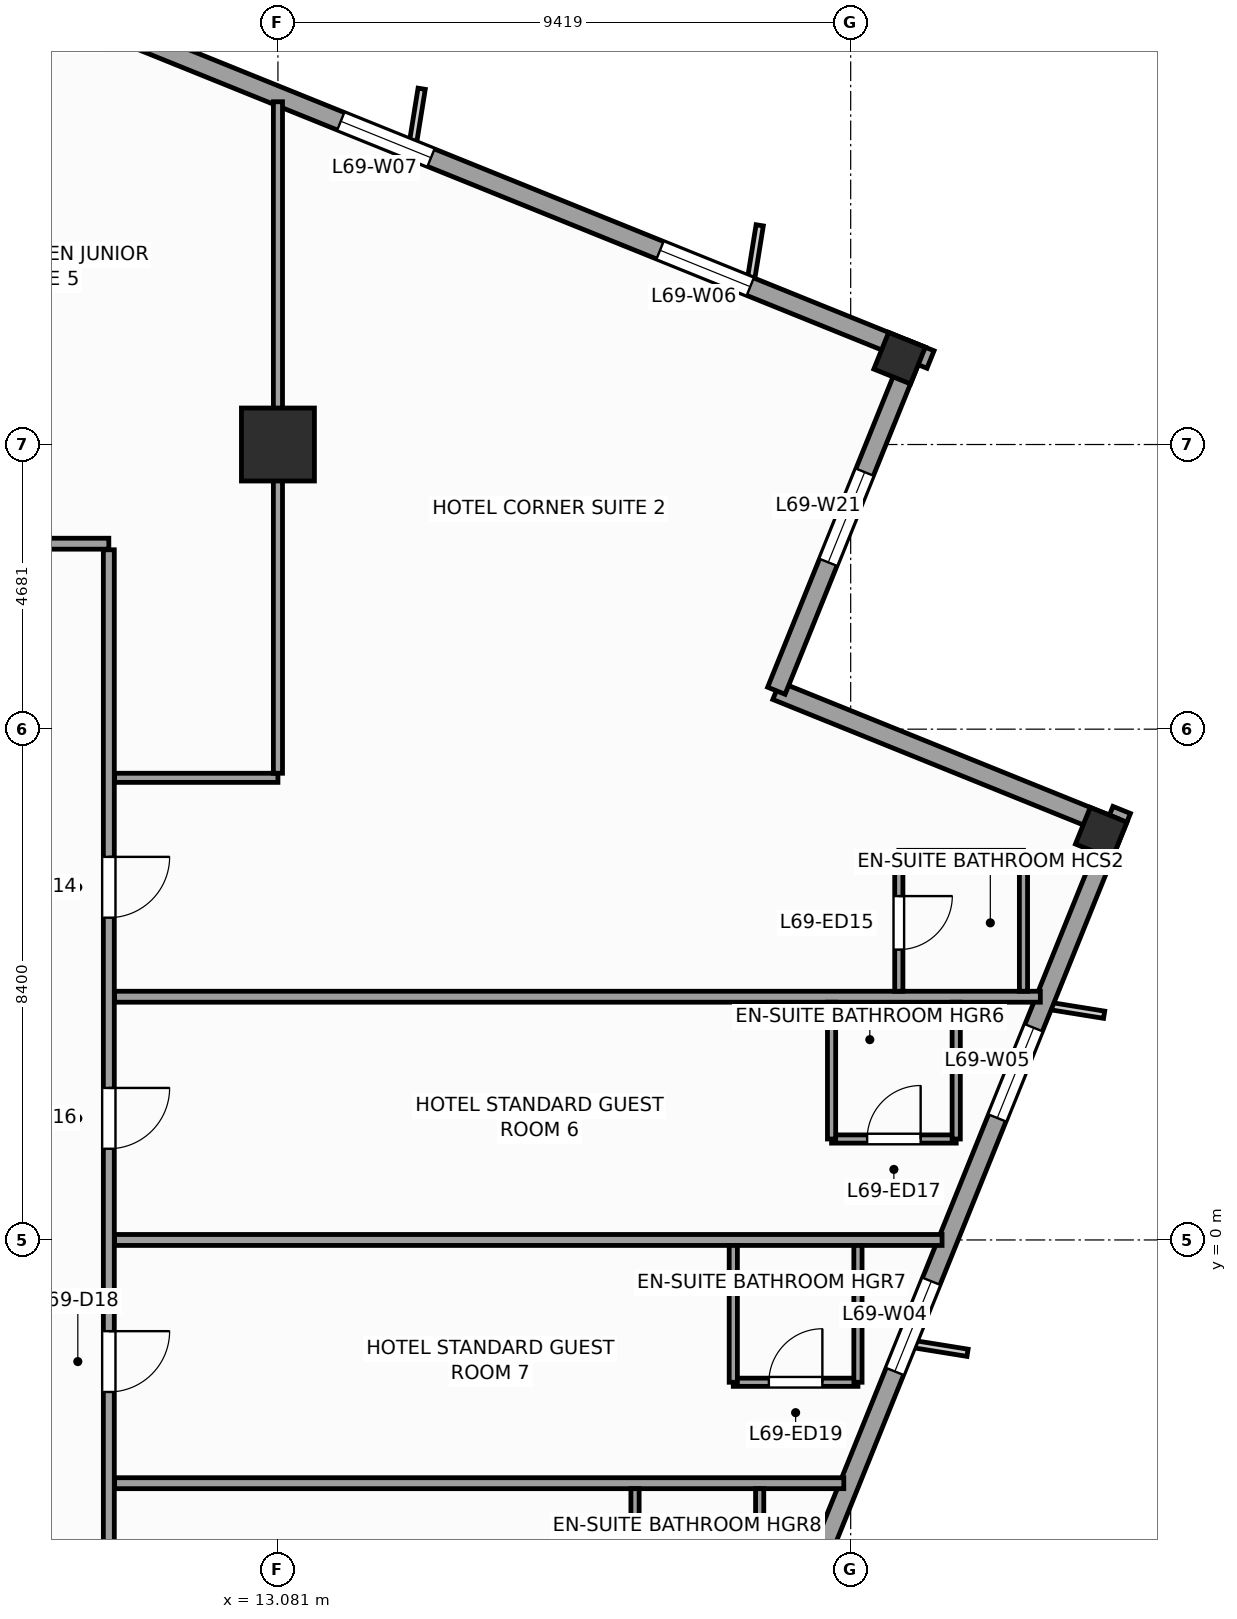
"""IFC4 building model, lengths in metres.
Left out: names, types, materials, properties, quantities, classifications, styles, units other than length and angle.
Written with IfcOpenShell. Run it as: python <this file> out.ifc"""

import sys

from ifc_helpers import new_model, si_unit, direction, frame, frame_2d, origin, origin_2d, place, context, subcontext, project, spatial, rectangle, extrude, source, transform, mapped, element, fill, save


model = new_model("IFC4")
c1 = context("Model", 3, precision=1e-05, world=origin(), true_north=direction((0.0, 1.0)))
c2 = subcontext(c1, "Body", "Model", "MODEL_VIEW")
j1 = project(units=[si_unit("LENGTHUNIT", "METRE"), si_unit("PLANEANGLEUNIT", "RADIAN")], contexts=[c1])
p1 = place(None, origin())
s1 = spatial("IfcSite", under=j1, at=p1, CompositionType="ELEMENT")
p2 = place(p1, origin())
s2 = spatial("IfcBuilding", under=s1, at=p2, CompositionType="ELEMENT")
p3 = place(p2, frame((0.0, 0.0, 283.2)))
s3 = spatial("IfcBuildingStorey", under=s2, at=p3, CompositionType="ELEMENT", Elevation=283.2)
m1 = source(origin(), c2, "Body", "SweptSolid", [
    extrude(rectangle(XDim=1.2, YDim=1.2, at=origin_2d()), origin(), (0.0, 0.0, 1.0), 3.6),
])
p4 = place(p3, frame((13.081, 13.081, 0.0), z_axis=(0.0, 0.0, 1.0), x_axis=(1.0, 0.0, 0.0)))
e1 = element("IfcColumn", 1, at=p4, inside=s3, PredefinedType="COLUMN", context=c2, shape_type="MappedRepresentation", body=[
    mapped(m1, transform((0.0, 0.0, 0.0), scale=1.0)),
])
m2 = source(origin(), c2, "Body", "SweptSolid", [
    extrude(rectangle(XDim=0.65, YDim=0.65, at=origin_2d()), origin(), (0.0, 0.0, 1.0), 3.6),
])
for number, where, z_axis, x_axis in (
    (2, (26.62, 6.69, 0.0), (0.0, 0.0, 1.0), (0.375, 0.927, 0.0)),
    (3, (23.304, 14.501, 0.0), (0.0, 0.0, 1.0), (0.375, 0.927, 0.0)),
):
    element("IfcColumn", number, at=place(p3, frame(where, z_axis=z_axis, x_axis=x_axis)), inside=s3, PredefinedType="COLUMN", context=c2, shape_type="MappedRepresentation", body=[
        mapped(m2, transform((0.0, 0.0, 0.0), scale=1.0)),
    ])
p5 = place(p3, frame((14.479, -23.813, 0.0), z_axis=(0.0, 0.0, 1.0), x_axis=(0.374609557019, 0.927182657188, 0.0)))
e4 = element("IfcWall", 4, at=p5, inside=s3, PredefinedType="STANDARD", context=c2, shape_type="SweptSolid", body=[
    extrude(rectangle(XDim=33.31, YDim=0.31, at=frame_2d((16.655, 0.0))), origin(), (0.0, 0.0, 1.0), 2.75),
])
p6 = place(p5, frame((10.53, 0.0, 0.0)))
e5 = element("IfcOpeningElement", 5, at=p6, cuts=e4, PredefinedType="OPENING", context=c2, shape_type="SweptSolid", body=[
    extrude(rectangle(XDim=1.05, YDim=2.25, at=frame_2d((0.525, 1.125))), frame((0.0, 0.165, 0.0), z_axis=(0.0, -1.0, 0.0), x_axis=(1.0, 0.0, 0.0)), (0.0, 0.0, 1.0), 0.33),
])
p7 = place(p5, frame((3.197, 0.0, 0.47)))
e6 = element("IfcOpeningElement", 6, at=p7, cuts=e4, PredefinedType="OPENING", context=c2, shape_type="SweptSolid", body=[
    extrude(rectangle(XDim=1.6, YDim=2.1, at=frame_2d((0.8, 1.05))), frame((0.0, 0.165, 0.0), z_axis=(0.0, -1.0, 0.0), x_axis=(1.0, 0.0, 0.0)), (0.0, 0.0, 1.0), 0.33),
])
p8 = place(p5, frame((7.36, 0.0, 0.47)))
e7 = element("IfcOpeningElement", 7, at=p8, cuts=e4, PredefinedType="OPENING", context=c2, shape_type="SweptSolid", body=[
    extrude(rectangle(XDim=1.6, YDim=2.1, at=frame_2d((0.8, 1.05))), frame((0.0, 0.165, 0.0), z_axis=(0.0, -1.0, 0.0), x_axis=(1.0, 0.0, 0.0)), (0.0, 0.0, 1.0), 0.33),
])
p9 = place(p5, frame((14.439, 0.0, 0.47)))
e8 = element("IfcOpeningElement", 8, at=p9, cuts=e4, PredefinedType="OPENING", context=c2, shape_type="SweptSolid", body=[
    extrude(rectangle(XDim=1.6, YDim=2.1, at=frame_2d((0.8, 1.05))), frame((0.0, 0.165, 0.0), z_axis=(0.0, -1.0, 0.0), x_axis=(1.0, 0.0, 0.0)), (0.0, 0.0, 1.0), 0.33),
])
p10 = place(p5, frame((23.351, 0.0, 0.47)))
e9 = element("IfcOpeningElement", 9, at=p10, cuts=e4, PredefinedType="OPENING", context=c2, shape_type="SweptSolid", body=[
    extrude(rectangle(XDim=1.6, YDim=2.1, at=frame_2d((0.8, 1.05))), frame((0.0, 0.165, 0.0), z_axis=(0.0, -1.0, 0.0), x_axis=(1.0, 0.0, 0.0)), (0.0, 0.0, 1.0), 0.33),
])
p11 = place(p5, frame((27.847, 0.0, 0.47)))
e10 = element("IfcOpeningElement", 10, at=p11, cuts=e4, PredefinedType="OPENING", context=c2, shape_type="SweptSolid", body=[
    extrude(rectangle(XDim=1.6, YDim=2.1, at=frame_2d((0.8, 1.05))), frame((0.0, 0.165, 0.0), z_axis=(0.0, -1.0, 0.0), x_axis=(1.0, 0.0, 0.0)), (0.0, 0.0, 1.0), 0.33),
])
p12 = place(p3, frame((26.841, 6.784, 0.0), z_axis=(0.0, 0.0, 1.0), x_axis=(-0.927171722085, 0.374636620962, 0.0)))
e11 = element("IfcWall", 11, at=p12, inside=s3, PredefinedType="STANDARD", context=c2, shape_type="SweptSolid", body=[
    extrude(rectangle(XDim=6.0, YDim=0.31, at=frame_2d((3.0, 0.0))), origin(), (0.0, 0.0, 1.0), 2.65),
])
p13 = place(p3, frame((21.278, 9.032, 0.0), z_axis=(0.0, 0.0, 1.0), x_axis=(0.374602739196, 0.927185411764, 0.0)))
e12 = element("IfcWall", 12, at=p13, inside=s3, PredefinedType="STANDARD", context=c2, shape_type="SweptSolid", body=[
    extrude(rectangle(XDim=6.155, YDim=0.31, at=frame_2d((3.078, 0.0))), origin(), (0.0, 0.0, 1.0), 3.35),
])
p14 = place(p13, frame((2.278, 0.0, 0.47)))
e13 = element("IfcOpeningElement", 13, at=p14, cuts=e12, PredefinedType="OPENING", context=c2, shape_type="SweptSolid", body=[
    extrude(rectangle(XDim=1.6, YDim=2.1, at=frame_2d((0.8, 1.05))), frame((0.0, 0.165, 0.0), z_axis=(0.0, -1.0, 0.0), x_axis=(1.0, 0.0, 0.0)), (0.0, 0.0, 1.0), 0.33),
])
p15 = place(p3, frame((23.813, 14.479, 0.0), z_axis=(0.0, 0.0, 1.0), x_axis=(-0.927182657188, 0.374609557019, 0.0)))
e14 = element("IfcWall", 14, at=p15, inside=s3, PredefinedType="STANDARD", context=c2, shape_type="SweptSolid", body=[
    extrude(rectangle(XDim=33.31, YDim=0.31, at=frame_2d((16.655, 0.0))), origin(), (0.0, 0.0, 1.0), 2.75),
])
p16 = place(p15, frame((3.197, 0.0, 0.47)))
e15 = element("IfcOpeningElement", 15, at=p16, cuts=e14, PredefinedType="OPENING", context=c2, shape_type="SweptSolid", body=[
    extrude(rectangle(XDim=1.6, YDim=2.1, at=frame_2d((0.8, 1.05))), frame((0.0, 0.165, 0.0), z_axis=(0.0, -1.0, 0.0), x_axis=(1.0, 0.0, 0.0)), (0.0, 0.0, 1.0), 0.33),
])
p17 = place(p15, frame((8.86, 0.0, 0.47)))
e16 = element("IfcOpeningElement", 16, at=p17, cuts=e14, PredefinedType="OPENING", context=c2, shape_type="SweptSolid", body=[
    extrude(rectangle(XDim=1.6, YDim=2.1, at=frame_2d((0.8, 1.05))), frame((0.0, 0.165, 0.0), z_axis=(0.0, -1.0, 0.0), x_axis=(1.0, 0.0, 0.0)), (0.0, 0.0, 1.0), 0.33),
])
p18 = place(p15, frame((14.439, 0.0, 0.47)))
e17 = element("IfcOpeningElement", 17, at=p18, cuts=e14, PredefinedType="OPENING", context=c2, shape_type="SweptSolid", body=[
    extrude(rectangle(XDim=1.6, YDim=2.1, at=frame_2d((0.8, 1.05))), frame((0.0, 0.165, 0.0), z_axis=(0.0, -1.0, 0.0), x_axis=(1.0, 0.0, 0.0)), (0.0, 0.0, 1.0), 0.33),
])
p19 = place(p15, frame((21.851, 0.0, 0.47)))
e18 = element("IfcOpeningElement", 18, at=p19, cuts=e14, PredefinedType="OPENING", context=c2, shape_type="SweptSolid", body=[
    extrude(rectangle(XDim=1.6, YDim=2.1, at=frame_2d((0.8, 1.05))), frame((0.0, 0.165, 0.0), z_axis=(0.0, -1.0, 0.0), x_axis=(1.0, 0.0, 0.0)), (0.0, 0.0, 1.0), 0.33),
])
p20 = place(p15, frame((27.097, 0.0, 0.47)))
e19 = element("IfcOpeningElement", 19, at=p20, cuts=e14, PredefinedType="OPENING", context=c2, shape_type="SweptSolid", body=[
    extrude(rectangle(XDim=1.6, YDim=2.1, at=frame_2d((0.8, 1.05))), frame((0.0, 0.165, 0.0), z_axis=(0.0, -1.0, 0.0), x_axis=(1.0, 0.0, 0.0)), (0.0, 0.0, 1.0), 0.33),
])
p21 = place(p3, frame((-11.45, 11.45, 0.0), z_axis=(0.0, 0.0, 1.0), x_axis=(1.0, 0.0, 0.0)))
e20 = element("IfcWall", 20, at=p21, inside=s3, PredefinedType="PARTITIONING", context=c2, shape_type="SweptSolid", body=[
    extrude(rectangle(XDim=21.75, YDim=0.18, at=frame_2d((10.875, 0.0))), origin(), (0.0, 0.0, 1.0), 3.35),
])
p22 = place(p21, frame((2.639, 0.0, 0.0)))
e21 = element("IfcOpeningElement", 21, at=p22, cuts=e20, PredefinedType="OPENING", context=c2, shape_type="SweptSolid", body=[
    extrude(rectangle(XDim=1.0, YDim=2.15, at=frame_2d((0.5, 1.075))), frame((0.0, 0.1, 0.0), z_axis=(0.0, -1.0, 0.0), x_axis=(1.0, 0.0, 0.0)), (0.0, 0.0, 1.0), 0.2),
])
p23 = place(p21, frame((7.8, 0.0, 0.0)))
e22 = element("IfcOpeningElement", 22, at=p23, cuts=e20, PredefinedType="OPENING", context=c2, shape_type="SweptSolid", body=[
    extrude(rectangle(XDim=1.0, YDim=2.15, at=frame_2d((0.5, 1.075))), frame((0.0, 0.1, 0.0), z_axis=(0.0, -1.0, 0.0), x_axis=(1.0, 0.0, 0.0)), (0.0, 0.0, 1.0), 0.2),
])
p24 = place(p21, frame((12.65, 0.0, 0.0)))
e23 = element("IfcOpeningElement", 23, at=p24, cuts=e20, PredefinedType="OPENING", context=c2, shape_type="SweptSolid", body=[
    extrude(rectangle(XDim=1.0, YDim=2.15, at=frame_2d((0.5, 1.075))), frame((0.0, 0.1, 0.0), z_axis=(0.0, -1.0, 0.0), x_axis=(1.0, 0.0, 0.0)), (0.0, 0.0, 1.0), 0.2),
])
p25 = place(p21, frame((18.036, 0.0, 0.0)))
e24 = element("IfcOpeningElement", 24, at=p25, cuts=e20, PredefinedType="OPENING", context=c2, shape_type="SweptSolid", body=[
    extrude(rectangle(XDim=1.0, YDim=2.15, at=frame_2d((0.5, 1.075))), frame((0.0, 0.1, 0.0), z_axis=(0.0, -1.0, 0.0), x_axis=(1.0, 0.0, 0.0)), (0.0, 0.0, 1.0), 0.2),
])
p26 = place(p3, frame((10.3, -12.35, 0.0), z_axis=(0.0, 0.0, 1.0), x_axis=(0.0, 1.0, 0.0)))
e25 = element("IfcWall", 25, at=p26, inside=s3, PredefinedType="PARTITIONING", context=c2, shape_type="SweptSolid", body=[
    extrude(rectangle(XDim=23.7, YDim=0.18, at=frame_2d((11.85, 0.0))), origin(), (0.0, 0.0, 1.0), 3.35),
])
p27 = place(p26, frame((17.65, 0.0, 0.0)))
e26 = element("IfcOpeningElement", 26, at=p27, cuts=e25, PredefinedType="OPENING", context=c2, shape_type="SweptSolid", body=[
    extrude(rectangle(XDim=1.0, YDim=2.15, at=frame_2d((0.5, 1.075))), frame((0.0, 0.1, 0.0), z_axis=(0.0, -1.0, 0.0), x_axis=(1.0, 0.0, 0.0)), (0.0, 0.0, 1.0), 0.2),
])
p28 = place(p26, frame((13.85, 0.0, 0.0)))
e27 = element("IfcOpeningElement", 27, at=p28, cuts=e25, PredefinedType="OPENING", context=c2, shape_type="SweptSolid", body=[
    extrude(rectangle(XDim=1.0, YDim=2.15, at=frame_2d((0.5, 1.075))), frame((0.0, 0.1, 0.0), z_axis=(0.0, -1.0, 0.0), x_axis=(1.0, 0.0, 0.0)), (0.0, 0.0, 1.0), 0.2),
])
p29 = place(p26, frame((9.85, 0.0, 0.0)))
e28 = element("IfcOpeningElement", 28, at=p29, cuts=e25, PredefinedType="OPENING", context=c2, shape_type="SweptSolid", body=[
    extrude(rectangle(XDim=1.0, YDim=2.15, at=frame_2d((0.5, 1.075))), frame((0.0, 0.1, 0.0), z_axis=(0.0, -1.0, 0.0), x_axis=(1.0, 0.0, 0.0)), (0.0, 0.0, 1.0), 0.2),
])
p30 = place(p26, frame((6.05, 0.0, 0.0)))
e29 = element("IfcOpeningElement", 29, at=p30, cuts=e25, PredefinedType="OPENING", context=c2, shape_type="SweptSolid", body=[
    extrude(rectangle(XDim=1.0, YDim=2.15, at=frame_2d((0.5, 1.075))), frame((0.0, 0.1, 0.0), z_axis=(0.0, -1.0, 0.0), x_axis=(1.0, 0.0, 0.0)), (0.0, 0.0, 1.0), 0.2),
])
p31 = place(p3, frame((10.395, 4.0, 0.0), z_axis=(0.0, 0.0, 1.0), x_axis=(1.0, 0.0, 0.0)))
e30 = element("IfcWall", 30, at=p31, inside=s3, PredefinedType="PARTITIONING", context=c2, shape_type="SweptSolid", body=[
    extrude(rectangle(XDim=15.224, YDim=0.18, at=frame_2d((7.612, 0.0))), origin(), (0.0, 0.0, 1.0), 3.35),
])
p32 = place(p3, frame((10.395, 0.0, 0.0), z_axis=(0.0, 0.0, 1.0), x_axis=(1.0, 0.0, 0.0)))
e31 = element("IfcWall", 31, at=p32, inside=s3, PredefinedType="PARTITIONING", context=c2, shape_type="SweptSolid", body=[
    extrude(rectangle(XDim=13.608, YDim=0.18, at=frame_2d((6.804, 0.0))), origin(), (0.0, 0.0, 1.0), 3.35),
])
p33 = place(p3, frame((10.395, -4.0, 0.0), z_axis=(0.0, 0.0, 1.0), x_axis=(1.0, 0.0, 0.0)))
e32 = element("IfcWall", 32, at=p33, inside=s3, PredefinedType="PARTITIONING", context=c2, shape_type="SweptSolid", body=[
    extrude(rectangle(XDim=11.992, YDim=0.18, at=frame_2d((5.996, 0.0))), origin(), (0.0, 0.0, 1.0), 3.35),
])
p34 = place(p3, frame((10.395, 7.6, 0.0), z_axis=(0.0, 0.0, 1.0), x_axis=(1.0, 0.0, 0.0)))
e33 = element("IfcWall", 33, at=p34, inside=s3, PredefinedType="PARTITIONING", context=c2, shape_type="SweptSolid", body=[
    extrude(rectangle(XDim=2.686, YDim=0.15, at=frame_2d((1.343, 0.0))), origin(), (0.0, 0.0, 1.0), 3.35),
])
p35 = place(p3, frame((13.081, 7.675, 0.0), z_axis=(0.0, 0.0, 1.0), x_axis=(0.0, 1.0, 0.0)))
e34 = element("IfcWall", 34, at=p35, inside=s3, PredefinedType="PARTITIONING", context=c2, shape_type="SweptSolid", body=[
    extrude(rectangle(XDim=11.043, YDim=0.15, at=frame_2d((5.521, 0.0))), origin(), (0.0, 0.0, 1.0), 2.45),
])
p36 = place(p3, frame((25.342, 4.09, 0.0), z_axis=(0.0, 0.0, 1.0), x_axis=(0.0, 1.0, 0.0)))
e35 = element("IfcWall", 35, at=p36, inside=s3, PredefinedType="PARTITIONING", context=c2, shape_type="SweptSolid", body=[
    extrude(rectangle(XDim=2.25, YDim=0.135, at=frame_2d((1.125, 0.0))), origin(), (0.0, 0.0, 1.0), 2.75),
])
p37 = place(p3, frame((23.292, 6.34, 0.0), z_axis=(0.0, 0.0, 1.0), x_axis=(1.0, 0.0, 0.0)))
e36 = element("IfcWall", 36, at=p37, inside=s3, PredefinedType="PARTITIONING", context=c2, shape_type="SweptSolid", body=[
    extrude(rectangle(XDim=2.05, YDim=0.135, at=frame_2d((1.025, 0.0))), origin(), (0.0, 0.0, 1.0), 3.35),
])
p38 = place(p3, frame((23.292, 4.09, 0.0), z_axis=(0.0, 0.0, 1.0), x_axis=(0.0, 1.0, 0.0)))
e37 = element("IfcWall", 37, at=p38, inside=s3, PredefinedType="PARTITIONING", context=c2, shape_type="SweptSolid", body=[
    extrude(rectangle(XDim=2.25, YDim=0.135, at=frame_2d((1.125, 0.0))), origin(), (0.0, 0.0, 1.0), 2.95),
])
p39 = place(p38, frame((0.685, 0.0, 0.0)))
e38 = element("IfcOpeningElement", 38, at=p39, cuts=e37, PredefinedType="OPENING", context=c2, shape_type="SweptSolid", body=[
    extrude(rectangle(XDim=0.88, YDim=2.1, at=frame_2d((0.44, 1.05))), frame((0.0, 0.078, 0.0), z_axis=(0.0, -1.0, 0.0), x_axis=(1.0, 0.0, 0.0)), (0.0, 0.0, 1.0), 0.155),
])
p40 = place(p3, frame((22.186, 1.66, 0.0), z_axis=(0.0, 0.0, 1.0), x_axis=(1.0, 0.0, 0.0)))
e39 = element("IfcWall", 39, at=p40, inside=s3, PredefinedType="PARTITIONING", context=c2, shape_type="SweptSolid", body=[
    extrude(rectangle(XDim=2.05, YDim=0.135, at=frame_2d((1.025, 0.0))), origin(), (0.0, 0.0, 1.0), 3.35),
])
p41 = place(p40, frame((0.585, 0.0, 0.0)))
e40 = element("IfcOpeningElement", 40, at=p41, cuts=e39, PredefinedType="OPENING", context=c2, shape_type="SweptSolid", body=[
    extrude(rectangle(XDim=0.88, YDim=2.1, at=frame_2d((0.44, 1.05))), frame((0.0, 0.078, 0.0), z_axis=(0.0, -1.0, 0.0), x_axis=(1.0, 0.0, 0.0)), (0.0, 0.0, 1.0), 0.155),
])
for number, where, z_axis, x_axis in (
    (41, (24.236, 1.66, 0.0), (0.0, 0.0, 1.0), (0.0, 1.0, 0.0)),
    (42, (22.186, 1.66, 0.0), (0.0, 0.0, 1.0), (0.0, 1.0, 0.0)),
):
    element("IfcWall", number, at=place(p3, frame(where, z_axis=z_axis, x_axis=x_axis)), inside=s3, PredefinedType="PARTITIONING", context=c2, shape_type="SweptSolid", body=[
        extrude(rectangle(XDim=2.25, YDim=0.135, at=frame_2d((1.125, 0.0))), origin(), (0.0, 0.0, 1.0), 3.35),
    ])
p42 = place(p3, frame((20.57, -2.34, 0.0), z_axis=(0.0, 0.0, 1.0), x_axis=(1.0, 0.0, 0.0)))
e43 = element("IfcWall", 43, at=p42, inside=s3, PredefinedType="PARTITIONING", context=c2, shape_type="SweptSolid", body=[
    extrude(rectangle(XDim=2.05, YDim=0.135, at=frame_2d((1.025, 0.0))), origin(), (0.0, 0.0, 1.0), 3.35),
])
p43 = place(p42, frame((0.585, 0.0, 0.0)))
e44 = element("IfcOpeningElement", 44, at=p43, cuts=e43, PredefinedType="OPENING", context=c2, shape_type="SweptSolid", body=[
    extrude(rectangle(XDim=0.88, YDim=2.1, at=frame_2d((0.44, 1.05))), frame((0.0, 0.078, 0.0), z_axis=(0.0, -1.0, 0.0), x_axis=(1.0, 0.0, 0.0)), (0.0, 0.0, 1.0), 0.155),
])
for number, where, z_axis, x_axis in (
    (45, (22.619, -2.34, 0.0), (0.0, 0.0, 1.0), (0.0, 1.0, 0.0)),
    (46, (20.57, -2.34, 0.0), (0.0, 0.0, 1.0), (0.0, 1.0, 0.0)),
    (47, (21.003, -6.34, 0.0), (0.0, 0.0, 1.0), (0.0, 1.0, 0.0)),
    (48, (18.953, -6.34, 0.0), (0.0, 0.0, 1.0), (0.0, 1.0, 0.0)),
):
    element("IfcWall", number, at=place(p3, frame(where, z_axis=z_axis, x_axis=x_axis)), inside=s3, PredefinedType="PARTITIONING", context=c2, shape_type="SweptSolid", body=[
        extrude(rectangle(XDim=2.25, YDim=0.135, at=frame_2d((1.125, 0.0))), origin(), (0.0, 0.0, 1.0), 3.35),
    ])
m3 = source(origin(), c2, "Body", "SweptSolid", [
    extrude(rectangle(XDim=1.6, YDim=2.1, at=frame_2d((0.8, 1.05))), frame((0.0, 0.03, 0.0), z_axis=(0.0, -1.0, 0.0), x_axis=(1.0, 0.0, 0.0)), (0.0, 0.0, 1.0), 0.06),
])
p44 = place(p10, origin())
e49 = element("IfcWindow", 49, at=p44, inside=s3, PartitioningType="SINGLE_PANEL", PredefinedType="WINDOW", context=c2, shape_type="MappedRepresentation", body=[
    mapped(m3, transform((0.0, 0.0, 0.0), scale=1.0)),
])
fill(e9, e49)
p45 = place(p11, origin())
e50 = element("IfcWindow", 50, at=p45, inside=s3, PartitioningType="SINGLE_PANEL", PredefinedType="WINDOW", context=c2, shape_type="MappedRepresentation", body=[
    mapped(m3, transform((0.0, 0.0, 0.0), scale=1.0)),
])
fill(e10, e50)
p46 = place(p16, origin())
e51 = element("IfcWindow", 51, at=p46, inside=s3, PartitioningType="SINGLE_PANEL", PredefinedType="WINDOW", context=c2, shape_type="MappedRepresentation", body=[
    mapped(m3, transform((0.0, 0.0, 0.0), scale=1.0)),
])
fill(e15, e51)
p47 = place(p17, origin())
e52 = element("IfcWindow", 52, at=p47, inside=s3, PartitioningType="SINGLE_PANEL", PredefinedType="WINDOW", context=c2, shape_type="MappedRepresentation", body=[
    mapped(m3, transform((0.0, 0.0, 0.0), scale=1.0)),
])
fill(e16, e52)
p48 = place(p14, origin())
e53 = element("IfcWindow", 53, at=p48, inside=s3, PartitioningType="SINGLE_PANEL", PredefinedType="WINDOW", context=c2, shape_type="MappedRepresentation", body=[
    mapped(m3, transform((0.0, 0.0, 0.0), scale=1.0)),
])
fill(e13, e53)
m4 = source(origin(), c2, "Body", "SweptSolid", [
    extrude(rectangle(XDim=1.0, YDim=2.15, at=frame_2d((0.5, 1.075))), frame((0.0, 0.025, 0.0), z_axis=(0.0, -1.0, 0.0), x_axis=(1.0, 0.0, 0.0)), (0.0, 0.0, 1.0), 0.05),
])
p49 = place(p27, frame((1.0, 0.0, 0.0), z_axis=(0.0, 0.0, 1.0), x_axis=(-1.0, 0.0, 0.0)))
e54 = element("IfcDoor", 54, at=p49, inside=s3, OperationType="SINGLE_SWING_RIGHT", PredefinedType="DOOR", context=c2, shape_type="MappedRepresentation", body=[
    mapped(m4, transform((0.0, 0.0, 0.0), scale=1.0)),
])
fill(e26, e54)
m5 = source(origin(), c2, "Body", "SweptSolid", [
    extrude(rectangle(XDim=0.88, YDim=2.1, at=frame_2d((0.44, 1.05))), frame((0.0, 0.025, 0.0), z_axis=(0.0, -1.0, 0.0), x_axis=(1.0, 0.0, 0.0)), (0.0, 0.0, 1.0), 0.05),
])
p50 = place(p39, frame((0.88, 0.0, 0.0), z_axis=(0.0, 0.0, 1.0), x_axis=(-1.0, 0.0, 0.0)))
e55 = element("IfcDoor", 55, at=p50, inside=s3, OperationType="SINGLE_SWING_RIGHT", PredefinedType="DOOR", context=c2, shape_type="MappedRepresentation", body=[
    mapped(m5, transform((0.0, 0.0, 0.0), scale=1.0)),
])
fill(e38, e55)
p51 = place(p28, frame((1.0, 0.0, 0.0), z_axis=(0.0, 0.0, 1.0), x_axis=(-1.0, 0.0, 0.0)))
e56 = element("IfcDoor", 56, at=p51, inside=s3, OperationType="SINGLE_SWING_RIGHT", PredefinedType="DOOR", context=c2, shape_type="MappedRepresentation", body=[
    mapped(m4, transform((0.0, 0.0, 0.0), scale=1.0)),
])
fill(e27, e56)
p52 = place(p41, origin())
e57 = element("IfcDoor", 57, at=p52, inside=s3, OperationType="SINGLE_SWING_RIGHT", PredefinedType="DOOR", context=c2, shape_type="MappedRepresentation", body=[
    mapped(m5, transform((0.0, 0.0, 0.0), scale=1.0)),
])
fill(e40, e57)
p53 = place(p29, frame((1.0, 0.0, 0.0), z_axis=(0.0, 0.0, 1.0), x_axis=(-1.0, 0.0, 0.0)))
e58 = element("IfcDoor", 58, at=p53, inside=s3, OperationType="SINGLE_SWING_RIGHT", PredefinedType="DOOR", context=c2, shape_type="MappedRepresentation", body=[
    mapped(m4, transform((0.0, 0.0, 0.0), scale=1.0)),
])
fill(e28, e58)
p54 = place(p43, origin())
e59 = element("IfcDoor", 59, at=p54, inside=s3, OperationType="SINGLE_SWING_RIGHT", PredefinedType="DOOR", context=c2, shape_type="MappedRepresentation", body=[
    mapped(m5, transform((0.0, 0.0, 0.0), scale=1.0)),
])
fill(e44, e59)
save(model, sys.argv[1])
